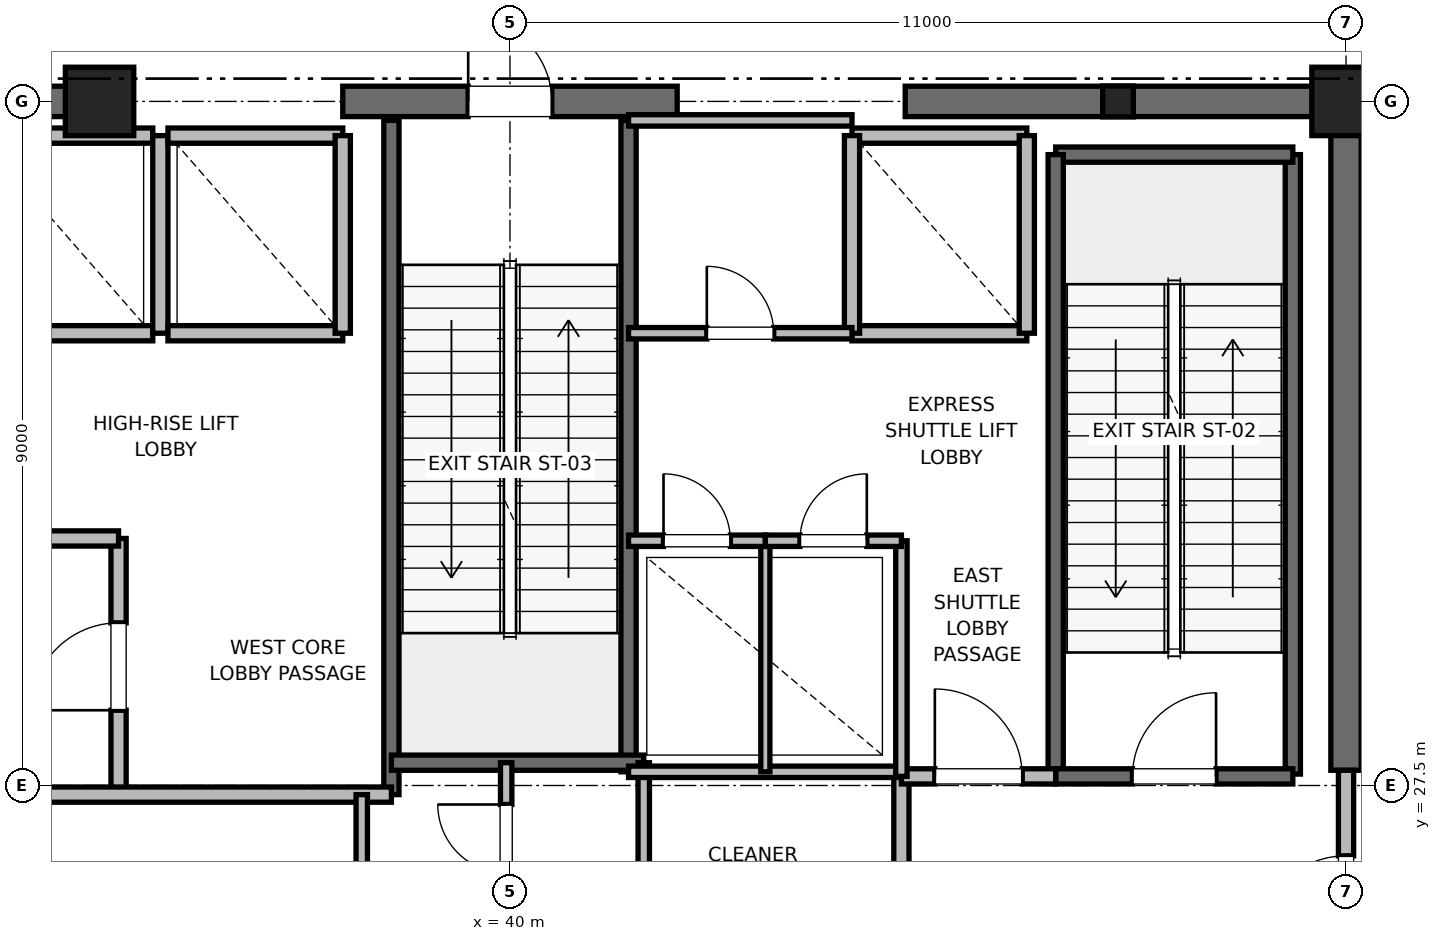
"""IFC4 building model, lengths in metres.
Left out: names, types, materials, properties, quantities, classifications, styles, units other than length and angle.
Written with IfcOpenShell. Run it as: python <this file> out.ifc"""

import sys

from ifc_helpers import new_model, si_unit, direction, frame, frame_2d, origin, origin_2d, place, context, subcontext, project, spatial, rectangle, i_section, extrude, element, fill, save


model = new_model("IFC4")
c1 = context("Model", 3, precision=1e-05, world=origin(), true_north=direction((0.0, 1.0)))
c2 = subcontext(c1, "Body", "Model", "MODEL_VIEW")
j1 = project(units=[si_unit("LENGTHUNIT", "METRE"), si_unit("PLANEANGLEUNIT", "RADIAN")], contexts=[c1])
p1 = place(None, origin())
s1 = spatial("IfcSite", under=j1, at=p1, CompositionType="ELEMENT")
p2 = place(p1, origin())
s2 = spatial("IfcBuilding", under=s1, at=p2, CompositionType="ELEMENT")
p3 = place(p2, frame((0.0, 0.0, 342.8)))
s3 = spatial("IfcBuildingStorey", under=s2, at=p3, CompositionType="ELEMENT", Elevation=342.8)
for number, where, z_axis, x_axis in (
    (1, (51.0, 36.5, 0.0), (0.0, 0.0, 1.0), (1.0, 0.0, 0.0)),
    (2, (34.6, 36.5, 0.0), (0.0, 0.0, 1.0), (1.0, 0.0, 0.0)),
):
    element("IfcColumn", number, at=place(p3, frame(where, z_axis=z_axis, x_axis=x_axis)), inside=s3, PredefinedType="PILASTER", context=c2, shape_type="SweptSolid", body=[
        extrude(rectangle(XDim=0.9, YDim=0.9, at=origin_2d()), origin(), (0.0, 0.0, 1.0), 6.0),
    ])
p4 = place(p3, frame((48.0, 36.5, 0.0), z_axis=(0.0, 0.0, 1.0), x_axis=(1.0, 0.0, 0.0)))
e3 = element("IfcColumn", 3, at=p4, inside=s3, PredefinedType="COLUMN", context=c2, shape_type="SweptSolid", body=[
    extrude(i_section(OverallWidth=0.403, OverallDepth=0.406, WebThickness=0.027, FlangeThickness=0.043, FilletRadius=0.015, at=origin_2d()), origin(), (0.0, 0.0, 1.0), 6.0),
])
p5 = place(p3, frame((29.0, 36.5, 0.0), z_axis=(0.0, 0.0, 1.0), x_axis=(1.0, 0.0, 0.0)))
e4 = element("IfcWall", 4, at=p5, inside=s3, PredefinedType="SHEAR", context=c2, shape_type="SweptSolid", body=[
    extrude(rectangle(XDim=5.8, YDim=0.4, at=frame_2d((2.9, 0.0))), origin(), (0.0, 0.0, 1.0), 5.7),
])
p6 = place(p3, frame((37.8, 36.5, 0.0), z_axis=(0.0, 0.0, 1.0), x_axis=(1.0, 0.0, 0.0)))
e5 = element("IfcWall", 5, at=p6, inside=s3, PredefinedType="SHEAR", context=c2, shape_type="SweptSolid", body=[
    extrude(rectangle(XDim=4.4, YDim=0.4, at=frame_2d((2.2, 0.0))), origin(), (0.0, 0.0, 1.0), 5.7),
])
p7 = place(p6, frame((1.65, 0.0, 0.0)))
e6 = element("IfcOpeningElement", 6, at=p7, cuts=e5, PredefinedType="OPENING", context=c2, shape_type="SweptSolid", body=[
    extrude(rectangle(XDim=1.1, YDim=2.15, at=frame_2d((0.55, 1.075))), frame((0.0, 0.2, 0.0), z_axis=(0.0, -1.0, 0.0), x_axis=(1.0, 0.0, 0.0)), (0.0, 0.0, 1.0), 0.4),
])
p8 = place(p3, frame((45.2, 36.5, 0.0), z_axis=(0.0, 0.0, 1.0), x_axis=(1.0, 0.0, 0.0)))
e7 = element("IfcWall", 7, at=p8, inside=s3, PredefinedType="SHEAR", context=c2, shape_type="SweptSolid", body=[
    extrude(rectangle(XDim=5.8, YDim=0.4, at=frame_2d((2.9, 0.0))), origin(), (0.0, 0.0, 1.0), 5.7),
])
p9 = place(p3, frame((51.0, 27.7, 0.0), z_axis=(0.0, 0.0, 1.0), x_axis=(0.0, 1.0, 0.0)))
e8 = element("IfcWall", 8, at=p9, inside=s3, PredefinedType="SHEAR", context=c2, shape_type="SweptSolid", body=[
    extrude(rectangle(XDim=8.8, YDim=0.4, at=frame_2d((4.4, 0.0))), origin(), (0.0, 0.0, 1.0), 5.7),
])
p10 = place(p3, frame((50.3, 27.65, 0.0), z_axis=(0.0, 0.0, 1.0), x_axis=(0.0, 1.0, 0.0)))
e9 = element("IfcWall", 9, at=p10, inside=s3, PredefinedType="SOLIDWALL", context=c2, shape_type="SweptSolid", body=[
    extrude(rectangle(XDim=8.15, YDim=0.2, at=frame_2d((4.075, 0.0))), origin(), (0.0, 0.0, 1.0), 5.7),
])
p11 = place(p3, frame((47.18, 35.8, 0.0), z_axis=(0.0, 0.0, 1.0), x_axis=(1.0, 0.0, 0.0)))
e10 = element("IfcWall", 10, at=p11, inside=s3, PredefinedType="SOLIDWALL", context=c2, shape_type="SweptSolid", body=[
    extrude(rectangle(XDim=3.12, YDim=0.2, at=frame_2d((1.56, 0.0))), origin(), (0.0, 0.0, 1.0), 5.7),
])
p12 = place(p3, frame((47.18, 27.62, 0.0), z_axis=(0.0, 0.0, 1.0), x_axis=(0.0, 1.0, 0.0)))
e11 = element("IfcWall", 11, at=p12, inside=s3, PredefinedType="SOLIDWALL", context=c2, shape_type="SweptSolid", body=[
    extrude(rectangle(XDim=8.18, YDim=0.2, at=frame_2d((4.09, 0.0))), origin(), (0.0, 0.0, 1.0), 5.7),
])
p13 = place(p3, frame((47.18, 27.62, 0.0), z_axis=(0.0, 0.0, 1.0), x_axis=(1.0, 0.0, 0.0)))
e12 = element("IfcWall", 12, at=p13, inside=s3, PredefinedType="SOLIDWALL", context=c2, shape_type="SweptSolid", body=[
    extrude(rectangle(XDim=3.12, YDim=0.2, at=frame_2d((1.56, 0.0))), origin(), (0.0, 0.0, 1.0), 5.7),
])
p14 = place(p13, frame((1.01, 0.0, 0.0)))
e13 = element("IfcOpeningElement", 13, at=p14, cuts=e12, PredefinedType="OPENING", context=c2, shape_type="SweptSolid", body=[
    extrude(rectangle(XDim=1.1, YDim=2.15, at=frame_2d((0.55, 1.075))), frame((0.0, 0.1, 0.0), z_axis=(0.0, -1.0, 0.0), x_axis=(1.0, 0.0, 0.0)), (0.0, 0.0, 1.0), 0.2),
])
p15 = place(p3, frame((38.44, 27.38, 0.0), z_axis=(0.0, 0.0, 1.0), x_axis=(0.0, 1.0, 0.0)))
e14 = element("IfcWall", 14, at=p15, inside=s3, PredefinedType="SOLIDWALL", context=c2, shape_type="SweptSolid", body=[
    extrude(rectangle(XDim=8.87, YDim=0.2, at=frame_2d((4.435, 0.0))), origin(), (0.0, 0.0, 1.0), 5.7),
])
p16 = place(p3, frame((41.56, 27.68, 0.0), z_axis=(0.0, 0.0, 1.0), x_axis=(0.0, 1.0, 0.0)))
e15 = element("IfcWall", 15, at=p16, inside=s3, PredefinedType="SOLIDWALL", context=c2, shape_type="SweptSolid", body=[
    extrude(rectangle(XDim=8.57, YDim=0.2, at=frame_2d((4.285, 0.0))), origin(), (0.0, 0.0, 1.0), 5.7),
])
p17 = place(p3, frame((38.44, 27.8, 0.0), z_axis=(0.0, 0.0, 1.0), x_axis=(1.0, 0.0, 0.0)))
e16 = element("IfcWall", 16, at=p17, inside=s3, PredefinedType="SOLIDWALL", context=c2, shape_type="SweptSolid", body=[
    extrude(rectangle(XDim=3.32, YDim=0.2, at=frame_2d((1.66, 0.0))), origin(), (0.0, 0.0, 1.0), 5.7),
])
p18 = place(p3, frame((34.85, 27.38, 0.0), z_axis=(0.0, 0.0, 1.0), x_axis=(0.0, 1.0, 0.0)))
e17 = element("IfcWall", 17, at=p18, inside=s3, PredefinedType="PARTITIONING", context=c2, shape_type="SweptSolid", body=[
    extrude(rectangle(XDim=3.37, YDim=0.2, at=frame_2d((1.685, 0.0))), origin(), (0.0, 0.0, 1.0), 5.7),
])
p19 = place(p18, frame((1.11, 0.0, 0.0)))
e18 = element("IfcOpeningElement", 18, at=p19, cuts=e17, PredefinedType="OPENING", context=c2, shape_type="SweptSolid", body=[
    extrude(rectangle(XDim=1.15, YDim=2.2, at=frame_2d((0.575, 1.1))), frame((0.0, 0.1, 0.0), z_axis=(0.0, -1.0, 0.0), x_axis=(1.0, 0.0, 0.0)), (0.0, 0.0, 1.0), 0.2),
])
p20 = place(p3, frame((32.82, 27.38, 0.0), z_axis=(0.0, 0.0, 1.0), x_axis=(1.0, 0.0, 0.0)))
e19 = element("IfcWall", 19, at=p20, inside=s3, PredefinedType="PARTITIONING", context=c2, shape_type="SweptSolid", body=[
    extrude(rectangle(XDim=5.62, YDim=0.2, at=frame_2d((2.81, 0.0))), origin(), (0.0, 0.0, 1.0), 5.7),
])
p21 = place(p3, frame((32.15, 30.75, 0.0), z_axis=(0.0, 0.0, 1.0), x_axis=(1.0, 0.0, 0.0)))
e20 = element("IfcWall", 20, at=p21, inside=s3, PredefinedType="PARTITIONING", context=c2, shape_type="SweptSolid", body=[
    extrude(rectangle(XDim=2.7, YDim=0.2, at=frame_2d((1.35, 0.0))), origin(), (0.0, 0.0, 1.0), 5.7),
])
p22 = place(p3, frame((45.15, 24.25, 0.0), z_axis=(0.0, 0.0, 1.0), x_axis=(0.0, 1.0, 0.0)))
e21 = element("IfcWall", 21, at=p22, inside=s3, PredefinedType="PARTITIONING", context=c2, shape_type="SweptSolid", body=[
    extrude(rectangle(XDim=3.37, YDim=0.2, at=frame_2d((1.685, 0.0))), origin(), (0.0, 0.0, 1.0), 5.7),
])
p23 = place(p3, frame((45.15, 27.62, 0.0), z_axis=(0.0, 0.0, 1.0), x_axis=(1.0, 0.0, 0.0)))
e22 = element("IfcWall", 22, at=p23, inside=s3, PredefinedType="PARTITIONING", context=c2, shape_type="SweptSolid", body=[
    extrude(rectangle(XDim=2.03, YDim=0.2, at=frame_2d((1.015, 0.0))), origin(), (0.0, 0.0, 1.0), 5.7),
])
p24 = place(p23, frame((0.44, 0.0, 0.0)))
e23 = element("IfcOpeningElement", 23, at=p24, cuts=e22, PredefinedType="OPENING", context=c2, shape_type="SweptSolid", body=[
    extrude(rectangle(XDim=1.15, YDim=2.2, at=frame_2d((0.575, 1.1))), frame((0.0, 0.1, 0.0), z_axis=(0.0, -1.0, 0.0), x_axis=(1.0, 0.0, 0.0)), (0.0, 0.0, 1.0), 0.2),
])
p25 = place(p3, frame((51.0, 24.3, 0.0), z_axis=(0.0, 0.0, 1.0), x_axis=(0.0, 1.0, 0.0)))
e24 = element("IfcWall", 24, at=p25, inside=s3, PredefinedType="PARTITIONING", context=c2, shape_type="SweptSolid", body=[
    extrude(rectangle(XDim=3.4, YDim=0.2, at=frame_2d((1.7, 0.0))), origin(), (0.0, 0.0, 1.0), 4.78),
])
p26 = place(p25, frame((1.125, 0.0, 0.0)))
e25 = element("IfcOpeningElement", 25, at=p26, cuts=e24, PredefinedType="OPENING", context=c2, shape_type="SweptSolid", body=[
    extrude(rectangle(XDim=1.15, YDim=2.2, at=frame_2d((0.575, 1.1))), frame((0.0, 0.1, 0.0), z_axis=(0.0, -1.0, 0.0), x_axis=(1.0, 0.0, 0.0)), (0.0, 0.0, 1.0), 0.2),
])
p27 = place(p3, frame((33.0, 33.45, 0.0), z_axis=(0.0, 0.0, 1.0), x_axis=(1.0, 0.0, 0.0)))
e26 = element("IfcWall", 26, at=p27, inside=s3, PredefinedType="SOLIDWALL", context=c2, shape_type="SweptSolid", body=[
    extrude(rectangle(XDim=2.3, YDim=0.2, at=frame_2d((1.15, 0.0))), origin(), (0.0, 0.0, 1.0), 5.7),
])
p28 = place(p3, frame((35.3, 36.05, 0.0), z_axis=(0.0, 0.0, 1.0), x_axis=(-1.0, 0.0, 0.0)))
e27 = element("IfcWall", 27, at=p28, inside=s3, PredefinedType="SOLIDWALL", context=c2, shape_type="SweptSolid", body=[
    extrude(rectangle(XDim=2.3, YDim=0.2, at=frame_2d((1.15, 0.0))), origin(), (0.0, 0.0, 1.0), 4.78),
])
p29 = place(p3, frame((35.4, 33.45, 0.0), z_axis=(0.0, 0.0, 1.0), x_axis=(0.0, 1.0, 0.0)))
e28 = element("IfcWall", 28, at=p29, inside=s3, PredefinedType="SOLIDWALL", context=c2, shape_type="SweptSolid", body=[
    extrude(rectangle(XDim=2.6, YDim=0.2, at=frame_2d((1.3, 0.0))), origin(), (0.0, 0.0, 1.0), 4.78),
])
p30 = place(p3, frame((35.5, 33.45, 0.0), z_axis=(0.0, 0.0, 1.0), x_axis=(1.0, 0.0, 0.0)))
e29 = element("IfcWall", 29, at=p30, inside=s3, PredefinedType="SOLIDWALL", context=c2, shape_type="SweptSolid", body=[
    extrude(rectangle(XDim=2.3, YDim=0.2, at=frame_2d((1.15, 0.0))), origin(), (0.0, 0.0, 1.0), 5.7),
])
p31 = place(p3, frame((37.8, 36.05, 0.0), z_axis=(0.0, 0.0, 1.0), x_axis=(-1.0, 0.0, 0.0)))
e30 = element("IfcWall", 30, at=p31, inside=s3, PredefinedType="SOLIDWALL", context=c2, shape_type="SweptSolid", body=[
    extrude(rectangle(XDim=2.3, YDim=0.2, at=frame_2d((1.15, 0.0))), origin(), (0.0, 0.0, 1.0), 4.78),
])
p32 = place(p3, frame((37.8, 33.45, 0.0), z_axis=(0.0, 0.0, 1.0), x_axis=(0.0, 1.0, 0.0)))
e31 = element("IfcWall", 31, at=p32, inside=s3, PredefinedType="SOLIDWALL", context=c2, shape_type="SweptSolid", body=[
    extrude(rectangle(XDim=2.6, YDim=0.2, at=frame_2d((1.3, 0.0))), origin(), (0.0, 0.0, 1.0), 4.78),
])
p33 = place(p3, frame((44.5, 33.45, 0.0), z_axis=(0.0, 0.0, 1.0), x_axis=(1.0, 0.0, 0.0)))
e32 = element("IfcWall", 32, at=p33, inside=s3, PredefinedType="SOLIDWALL", context=c2, shape_type="SweptSolid", body=[
    extrude(rectangle(XDim=2.3, YDim=0.2, at=frame_2d((1.15, 0.0))), origin(), (0.0, 0.0, 1.0), 5.7),
])
p34 = place(p3, frame((46.8, 36.05, 0.0), z_axis=(0.0, 0.0, 1.0), x_axis=(-1.0, 0.0, 0.0)))
e33 = element("IfcWall", 33, at=p34, inside=s3, PredefinedType="SOLIDWALL", context=c2, shape_type="SweptSolid", body=[
    extrude(rectangle(XDim=2.3, YDim=0.2, at=frame_2d((1.15, 0.0))), origin(), (0.0, 0.0, 1.0), 4.78),
])
p35 = place(p3, frame((44.5, 36.05, 0.0), z_axis=(0.0, 0.0, 1.0), x_axis=(0.0, -1.0, 0.0)))
e34 = element("IfcWall", 34, at=p35, inside=s3, PredefinedType="SOLIDWALL", context=c2, shape_type="SweptSolid", body=[
    extrude(rectangle(XDim=2.6, YDim=0.2, at=frame_2d((1.3, 0.0))), origin(), (0.0, 0.0, 1.0), 4.78),
])
p36 = place(p3, frame((46.8, 33.45, 0.0), z_axis=(0.0, 0.0, 1.0), x_axis=(0.0, 1.0, 0.0)))
e35 = element("IfcWall", 35, at=p36, inside=s3, PredefinedType="SOLIDWALL", context=c2, shape_type="SweptSolid", body=[
    extrude(rectangle(XDim=2.6, YDim=0.2, at=frame_2d((1.3, 0.0))), origin(), (0.0, 0.0, 1.0), 5.7),
])
p37 = place(p3, frame((41.76, 23.8, 0.0), z_axis=(0.0, 0.0, 1.0), x_axis=(0.0, 1.0, 0.0)))
e36 = element("IfcWall", 36, at=p37, inside=s3, PredefinedType="PARTITIONING", context=c2, shape_type="SweptSolid", body=[
    extrude(rectangle(XDim=4.0, YDim=0.15, at=frame_2d((2.0, 0.0))), origin(), (0.0, 0.0, 1.0), 2.85),
])
p38 = place(p3, frame((39.95, 25.8, 0.0), z_axis=(0.0, 0.0, 1.0), x_axis=(0.0, 1.0, 0.0)))
e37 = element("IfcWall", 37, at=p38, inside=s3, PredefinedType="PARTITIONING", context=c2, shape_type="SweptSolid", body=[
    extrude(rectangle(XDim=2.0, YDim=0.15, at=frame_2d((1.0, 0.0))), origin(), (0.0, 0.0, 1.0), 2.85),
])
p39 = place(p38, frame((0.55, 0.0, 0.0)))
e38 = element("IfcOpeningElement", 38, at=p39, cuts=e37, PredefinedType="OPENING", context=c2, shape_type="SweptSolid", body=[
    extrude(rectangle(XDim=0.9, YDim=2.1, at=frame_2d((0.45, 1.05))), frame((0.0, 0.075, 0.0), z_axis=(0.0, -1.0, 0.0), x_axis=(1.0, 0.0, 0.0)), (0.0, 0.0, 1.0), 0.15),
])
p40 = place(p3, frame((38.05, 23.06, 0.0), z_axis=(0.0, 0.0, 1.0), x_axis=(0.0, 1.0, 0.0)))
e39 = element("IfcWall", 39, at=p40, inside=s3, PredefinedType="PARTITIONING", context=c2, shape_type="SweptSolid", body=[
    extrude(rectangle(XDim=4.32, YDim=0.15, at=frame_2d((2.16, 0.0))), origin(), (0.0, 0.0, 1.0), 2.85),
])
p41 = place(p40, frame((1.72, 0.0, 0.0)))
e40 = element("IfcOpeningElement", 40, at=p41, cuts=e39, PredefinedType="OPENING", context=c2, shape_type="SweptSolid", body=[
    extrude(rectangle(XDim=0.88, YDim=2.1, at=frame_2d((0.44, 1.05))), frame((0.0, 0.075, 0.0), z_axis=(0.0, -1.0, 0.0), x_axis=(1.0, 0.0, 0.0)), (0.0, 0.0, 1.0), 0.15),
])
p42 = place(p3, frame((41.56, 27.68, 0.0), z_axis=(0.0, 0.0, 1.0), x_axis=(1.0, 0.0, 0.0)))
e41 = element("IfcWall", 41, at=p42, inside=s3, PredefinedType="PARTITIONING", context=c2, shape_type="SweptSolid", body=[
    extrude(rectangle(XDim=3.59, YDim=0.15, at=frame_2d((1.795, 0.0))), origin(), (0.0, 0.0, 1.0), 2.85),
])
p43 = place(p3, frame((45.15, 27.62, 0.0), z_axis=(0.0, 0.0, 1.0), x_axis=(0.0, 1.0, 0.0)))
e42 = element("IfcWall", 42, at=p43, inside=s3, PredefinedType="PARTITIONING", context=c2, shape_type="SweptSolid", body=[
    extrude(rectangle(XDim=3.1, YDim=0.15, at=frame_2d((1.55, 0.0))), origin(), (0.0, 0.0, 1.0), 2.85),
])
p44 = place(p3, frame((43.36, 27.68, 0.0), z_axis=(0.0, 0.0, 1.0), x_axis=(0.0, 1.0, 0.0)))
e43 = element("IfcWall", 43, at=p44, inside=s3, PredefinedType="PARTITIONING", context=c2, shape_type="SweptSolid", body=[
    extrude(rectangle(XDim=3.04, YDim=0.12, at=frame_2d((1.52, 0.0))), origin(), (0.0, 0.0, 1.0), 2.85),
])
p45 = place(p3, frame((41.56, 30.72, 0.0), z_axis=(0.0, 0.0, 1.0), x_axis=(1.0, 0.0, 0.0)))
e44 = element("IfcWall", 44, at=p45, inside=s3, PredefinedType="PARTITIONING", context=c2, shape_type="SweptSolid", body=[
    extrude(rectangle(XDim=1.8, YDim=0.15, at=frame_2d((0.9, 0.0))), origin(), (0.0, 0.0, 1.0), 2.85),
])
p46 = place(p45, frame((0.46, 0.0, 0.0)))
e45 = element("IfcOpeningElement", 45, at=p46, cuts=e44, PredefinedType="OPENING", context=c2, shape_type="SweptSolid", body=[
    extrude(rectangle(XDim=0.88, YDim=2.1, at=frame_2d((0.44, 1.05))), frame((0.0, 0.075, 0.0), z_axis=(0.0, -1.0, 0.0), x_axis=(1.0, 0.0, 0.0)), (0.0, 0.0, 1.0), 0.15),
])
p47 = place(p3, frame((43.36, 30.72, 0.0), z_axis=(0.0, 0.0, 1.0), x_axis=(1.0, 0.0, 0.0)))
e46 = element("IfcWall", 46, at=p47, inside=s3, PredefinedType="PARTITIONING", context=c2, shape_type="SweptSolid", body=[
    extrude(rectangle(XDim=1.79, YDim=0.15, at=frame_2d((0.895, 0.0))), origin(), (0.0, 0.0, 1.0), 2.85),
])
p48 = place(p47, frame((0.455, 0.0, 0.0)))
e47 = element("IfcOpeningElement", 47, at=p48, cuts=e46, PredefinedType="OPENING", context=c2, shape_type="SweptSolid", body=[
    extrude(rectangle(XDim=0.88, YDim=2.1, at=frame_2d((0.44, 1.05))), frame((0.0, 0.075, 0.0), z_axis=(0.0, -1.0, 0.0), x_axis=(1.0, 0.0, 0.0)), (0.0, 0.0, 1.0), 0.15),
])
p49 = place(p3, frame((41.56, 36.25, 0.0), z_axis=(0.0, 0.0, 1.0), x_axis=(1.0, 0.0, 0.0)))
e48 = element("IfcWall", 48, at=p49, inside=s3, PredefinedType="PARTITIONING", context=c2, shape_type="SweptSolid", body=[
    extrude(rectangle(XDim=2.94, YDim=0.15, at=frame_2d((1.47, 0.0))), origin(), (0.0, 0.0, 1.0), 2.85),
])
p50 = place(p3, frame((41.56, 33.45, 0.0), z_axis=(0.0, 0.0, 1.0), x_axis=(1.0, 0.0, 0.0)))
e49 = element("IfcWall", 49, at=p50, inside=s3, PredefinedType="PARTITIONING", context=c2, shape_type="SweptSolid", body=[
    extrude(rectangle(XDim=2.94, YDim=0.15, at=frame_2d((1.47, 0.0))), origin(), (0.0, 0.0, 1.0), 2.85),
])
p51 = place(p50, frame((1.03, 0.0, 0.0)))
e50 = element("IfcOpeningElement", 50, at=p51, cuts=e49, PredefinedType="OPENING", context=c2, shape_type="SweptSolid", body=[
    extrude(rectangle(XDim=0.88, YDim=2.1, at=frame_2d((0.44, 1.05))), frame((0.0, 0.075, 0.0), z_axis=(0.0, -1.0, 0.0), x_axis=(1.0, 0.0, 0.0)), (0.0, 0.0, 1.0), 0.15),
])
p52 = place(p14, origin())
e51 = element("IfcDoor", 51, at=p52, inside=s3, OperationType="SINGLE_SWING_RIGHT", PredefinedType="DOOR", context=c2, shape_type="SweptSolid", body=[
    extrude(rectangle(XDim=1.1, YDim=2.15, at=frame_2d((0.55, 1.075))), frame((0.0, 0.025, 0.0), z_axis=(0.0, -1.0, 0.0), x_axis=(1.0, 0.0, 0.0)), (0.0, 0.0, 1.0), 0.05),
])
fill(e13, e51)
p53 = place(p7, origin())
e52 = element("IfcDoor", 52, at=p53, inside=s3, OperationType="SINGLE_SWING_LEFT", PredefinedType="DOOR", context=c2, shape_type="SweptSolid", body=[
    extrude(rectangle(XDim=1.1, YDim=2.15, at=frame_2d((0.55, 1.075))), frame((0.0, 0.025, 0.0), z_axis=(0.0, -1.0, 0.0), x_axis=(1.0, 0.0, 0.0)), (0.0, 0.0, 1.0), 0.05),
])
fill(e6, e52)
p54 = place(p19, origin())
e53 = element("IfcDoor", 53, at=p54, inside=s3, OperationType="SINGLE_SWING_LEFT", PredefinedType="DOOR", context=c2, shape_type="SweptSolid", body=[
    extrude(rectangle(XDim=1.15, YDim=2.2, at=frame_2d((0.575, 1.1))), frame((0.0, 0.025, 0.0), z_axis=(0.0, -1.0, 0.0), x_axis=(1.0, 0.0, 0.0)), (0.0, 0.0, 1.0), 0.05),
])
fill(e18, e53)
p55 = place(p24, origin())
e54 = element("IfcDoor", 54, at=p55, inside=s3, OperationType="SINGLE_SWING_LEFT", PredefinedType="DOOR", context=c2, shape_type="SweptSolid", body=[
    extrude(rectangle(XDim=1.15, YDim=2.2, at=frame_2d((0.575, 1.1))), frame((0.0, 0.025, 0.0), z_axis=(0.0, -1.0, 0.0), x_axis=(1.0, 0.0, 0.0)), (0.0, 0.0, 1.0), 0.05),
])
fill(e23, e54)
p56 = place(p26, origin())
e55 = element("IfcDoor", 55, at=p56, inside=s3, OperationType="SINGLE_SWING_LEFT", PredefinedType="DOOR", context=c2, shape_type="SweptSolid", body=[
    extrude(rectangle(XDim=1.15, YDim=2.2, at=frame_2d((0.575, 1.1))), frame((0.0, 0.025, 0.0), z_axis=(0.0, -1.0, 0.0), x_axis=(1.0, 0.0, 0.0)), (0.0, 0.0, 1.0), 0.05),
])
fill(e25, e55)
p57 = place(p39, origin())
e56 = element("IfcDoor", 56, at=p57, inside=s3, OperationType="SINGLE_SWING_RIGHT", PredefinedType="DOOR", context=c2, shape_type="SweptSolid", body=[
    extrude(rectangle(XDim=0.9, YDim=2.1, at=frame_2d((0.45, 1.05))), frame((0.0, 0.025, 0.0), z_axis=(0.0, -1.0, 0.0), x_axis=(1.0, 0.0, 0.0)), (0.0, 0.0, 1.0), 0.05),
])
fill(e38, e56)
p58 = place(p46, origin())
e57 = element("IfcDoor", 57, at=p58, inside=s3, OperationType="SINGLE_SWING_LEFT", PredefinedType="DOOR", context=c2, shape_type="SweptSolid", body=[
    extrude(rectangle(XDim=0.88, YDim=2.1, at=frame_2d((0.44, 1.05))), frame((0.0, 0.025, 0.0), z_axis=(0.0, -1.0, 0.0), x_axis=(1.0, 0.0, 0.0)), (0.0, 0.0, 1.0), 0.05),
])
fill(e45, e57)
p59 = place(p48, origin())
e58 = element("IfcDoor", 58, at=p59, inside=s3, OperationType="SINGLE_SWING_RIGHT", PredefinedType="DOOR", context=c2, shape_type="SweptSolid", body=[
    extrude(rectangle(XDim=0.88, YDim=2.1, at=frame_2d((0.44, 1.05))), frame((0.0, 0.025, 0.0), z_axis=(0.0, -1.0, 0.0), x_axis=(1.0, 0.0, 0.0)), (0.0, 0.0, 1.0), 0.05),
])
fill(e47, e58)
p60 = place(p51, origin())
e59 = element("IfcDoor", 59, at=p60, inside=s3, OperationType="SINGLE_SWING_LEFT", PredefinedType="DOOR", context=c2, shape_type="SweptSolid", body=[
    extrude(rectangle(XDim=0.88, YDim=2.1, at=frame_2d((0.44, 1.05))), frame((0.0, 0.025, 0.0), z_axis=(0.0, -1.0, 0.0), x_axis=(1.0, 0.0, 0.0)), (0.0, 0.0, 1.0), 0.05),
])
fill(e50, e59)
save(model, sys.argv[1])
